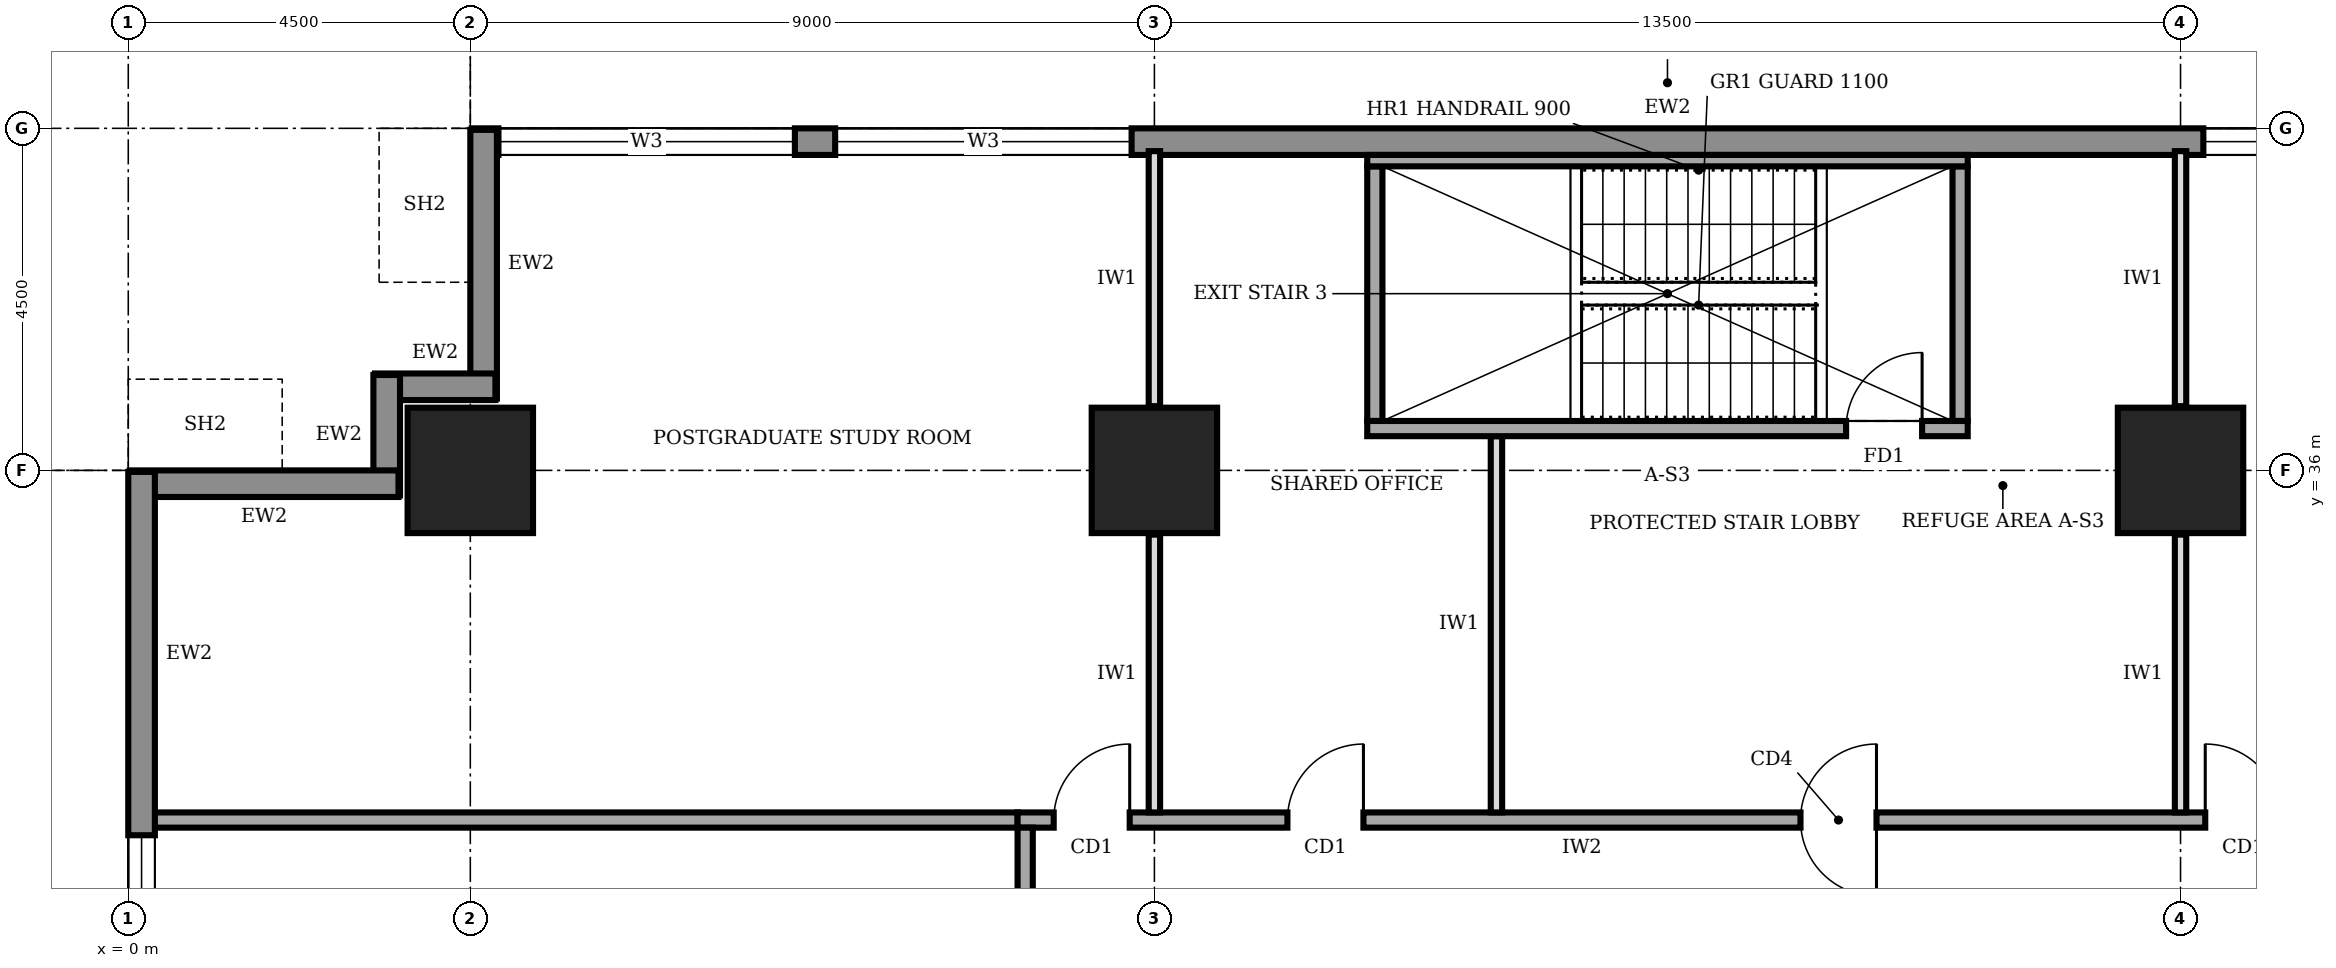
"""IFC4 building model, lengths in metres.
Left out: names, types, materials, properties, quantities, classifications, styles, units other than length and angle.
Written with IfcOpenShell. Run it as: python <this file> out.ifc"""

import sys

from ifc_helpers import new_model, si_unit, direction, frame, frame_2d, origin, origin_2d, place, context, subcontext, project, spatial, rectangle, extrude, element, fill, save


model = new_model("IFC4")
c1 = context("Model", 3, precision=1e-05, world=origin(), true_north=direction((0.0, 1.0)))
c2 = subcontext(c1, "Body", "Model", "MODEL_VIEW")
j1 = project(units=[si_unit("LENGTHUNIT", "METRE"), si_unit("PLANEANGLEUNIT", "RADIAN")], contexts=[c1])
p1 = place(None, origin())
s1 = spatial("IfcSite", under=j1, at=p1, CompositionType="ELEMENT")
p2 = place(p1, origin())
s2 = spatial("IfcBuilding", under=s1, at=p2, CompositionType="ELEMENT")
p3 = place(p2, frame((0.0, 0.0, 177.0)))
s3 = spatial("IfcBuildingStorey", under=s2, at=p3, CompositionType="ELEMENT", Elevation=177.0)
for number, where, z_axis, x_axis in (
    (1, (4.5, 36.0, 0.0), (0.0, 0.0, 1.0), (1.0, 0.0, 0.0)),
    (2, (13.5, 36.0, 0.0), (0.0, 0.0, 1.0), (1.0, 0.0, 0.0)),
    (3, (27.0, 36.0, 0.0), (0.0, 0.0, 1.0), (1.0, 0.0, 0.0)),
):
    element("IfcColumn", number, at=place(p3, frame(where, z_axis=z_axis, x_axis=x_axis)), inside=s3, PredefinedType="COLUMN", context=c2, shape_type="SweptSolid", body=[
        extrude(rectangle(XDim=1.65, YDim=1.65, at=origin_2d()), origin(), (0.0, 0.0, 1.0), 4.0),
    ])
p4 = place(p3, frame((35.98, 40.325, 0.0), z_axis=(0.0, 0.0, 1.0), x_axis=(-1.0, 0.0, 0.0)))
e4 = element("IfcWall", 4, at=p4, inside=s3, PredefinedType="STANDARD", context=c2, shape_type="SweptSolid", body=[
    extrude(rectangle(XDim=31.46, YDim=0.35, at=frame_2d((15.73, 0.0))), origin(), (0.0, 0.0, 1.0), 3.75),
])
p5 = place(p4, frame((27.21, 0.0, 0.95)))
e5 = element("IfcOpeningElement", 5, at=p5, cuts=e4, PredefinedType="OPENING", context=c2, shape_type="SweptSolid", body=[
    extrude(rectangle(XDim=3.9, YDim=1.8, at=frame_2d((1.95, 0.9))), frame((0.0, 0.185, 0.0), z_axis=(0.0, -1.0, 0.0), x_axis=(1.0, 0.0, 0.0)), (0.0, 0.0, 1.0), 0.37),
])
p6 = place(p4, frame((22.78, 0.0, 0.95)))
e6 = element("IfcOpeningElement", 6, at=p6, cuts=e4, PredefinedType="OPENING", context=c2, shape_type="SweptSolid", body=[
    extrude(rectangle(XDim=3.9, YDim=1.8, at=frame_2d((1.95, 0.9))), frame((0.0, 0.185, 0.0), z_axis=(0.0, -1.0, 0.0), x_axis=(1.0, 0.0, 0.0)), (0.0, 0.0, 1.0), 0.37),
])
p7 = place(p4, frame((4.78, 0.0, 0.95)))
e7 = element("IfcOpeningElement", 7, at=p7, cuts=e4, PredefinedType="OPENING", context=c2, shape_type="SweptSolid", body=[
    extrude(rectangle(XDim=3.9, YDim=1.8, at=frame_2d((1.95, 0.9))), frame((0.0, 0.185, 0.0), z_axis=(0.0, -1.0, 0.0), x_axis=(1.0, 0.0, 0.0)), (0.0, 0.0, 1.0), 0.37),
])
p8 = place(p3, frame((4.675, 40.48, 0.0), z_axis=(0.0, 0.0, 1.0), x_axis=(0.0, -1.0, 0.0)))
e8 = element("IfcWall", 8, at=p8, inside=s3, PredefinedType="STANDARD", context=c2, shape_type="SweptSolid", body=[
    extrude(rectangle(XDim=3.535, YDim=0.35, at=frame_2d((1.768, 0.0))), origin(), (0.0, 0.0, 1.0), 2.85),
])
for number, where, z_axis, x_axis in (
    (9, (4.83, 37.1, 0.0), (0.0, 0.0, 1.0), (-1.0, 0.0, 0.0)),
    (10, (3.4, 37.255, 0.0), (0.0, 0.0, 1.0), (0.0, -1.0, 0.0)),
):
    element("IfcWall", number, at=place(p3, frame(where, z_axis=z_axis, x_axis=x_axis)), inside=s3, PredefinedType="STANDARD", context=c2, shape_type="SweptSolid", body=[
        extrude(rectangle(XDim=1.585, YDim=0.35, at=frame_2d((0.792, 0.0))), origin(), (0.0, 0.0, 1.0), 3.75),
    ])
p9 = place(p3, frame((3.555, 35.825, 0.0), z_axis=(0.0, 0.0, 1.0), x_axis=(-1.0, 0.0, 0.0)))
e11 = element("IfcWall", 11, at=p9, inside=s3, PredefinedType="STANDARD", context=c2, shape_type="SweptSolid", body=[
    extrude(rectangle(XDim=3.535, YDim=0.35, at=frame_2d((1.768, 0.0))), origin(), (0.0, 0.0, 1.0), 2.85),
])
p10 = place(p3, frame((0.175, 35.98, 0.0), z_axis=(0.0, 0.0, 1.0), x_axis=(0.0, -1.0, 0.0)))
e12 = element("IfcWall", 12, at=p10, inside=s3, PredefinedType="STANDARD", context=c2, shape_type="SweptSolid", body=[
    extrude(rectangle(XDim=31.46, YDim=0.35, at=frame_2d((15.73, 0.0))), origin(), (0.0, 0.0, 1.0), 3.75),
])
p11 = place(p10, frame((27.21, 0.0, 0.95)))
e13 = element("IfcOpeningElement", 13, at=p11, cuts=e12, PredefinedType="OPENING", context=c2, shape_type="SweptSolid", body=[
    extrude(rectangle(XDim=3.9, YDim=1.8, at=frame_2d((1.95, 0.9))), frame((0.0, 0.185, 0.0), z_axis=(0.0, -1.0, 0.0), x_axis=(1.0, 0.0, 0.0)), (0.0, 0.0, 1.0), 0.37),
])
p12 = place(p10, frame((22.78, 0.0, 0.95)))
e14 = element("IfcOpeningElement", 14, at=p12, cuts=e12, PredefinedType="OPENING", context=c2, shape_type="SweptSolid", body=[
    extrude(rectangle(XDim=3.9, YDim=1.8, at=frame_2d((1.95, 0.9))), frame((0.0, 0.185, 0.0), z_axis=(0.0, -1.0, 0.0), x_axis=(1.0, 0.0, 0.0)), (0.0, 0.0, 1.0), 0.37),
])
p13 = place(p10, frame((18.28, 0.0, 0.95)))
e15 = element("IfcOpeningElement", 15, at=p13, cuts=e12, PredefinedType="OPENING", context=c2, shape_type="SweptSolid", body=[
    extrude(rectangle(XDim=3.9, YDim=1.8, at=frame_2d((1.95, 0.9))), frame((0.0, 0.185, 0.0), z_axis=(0.0, -1.0, 0.0), x_axis=(1.0, 0.0, 0.0)), (0.0, 0.0, 1.0), 0.37),
])
p14 = place(p10, frame((13.78, 0.0, 0.95)))
e16 = element("IfcOpeningElement", 16, at=p14, cuts=e12, PredefinedType="OPENING", context=c2, shape_type="SweptSolid", body=[
    extrude(rectangle(XDim=3.9, YDim=1.8, at=frame_2d((1.95, 0.9))), frame((0.0, 0.185, 0.0), z_axis=(0.0, -1.0, 0.0), x_axis=(1.0, 0.0, 0.0)), (0.0, 0.0, 1.0), 0.37),
])
p15 = place(p10, frame((9.28, 0.0, 0.95)))
e17 = element("IfcOpeningElement", 17, at=p15, cuts=e12, PredefinedType="OPENING", context=c2, shape_type="SweptSolid", body=[
    extrude(rectangle(XDim=3.9, YDim=1.8, at=frame_2d((1.95, 0.9))), frame((0.0, 0.185, 0.0), z_axis=(0.0, -1.0, 0.0), x_axis=(1.0, 0.0, 0.0)), (0.0, 0.0, 1.0), 0.37),
])
p16 = place(p10, frame((4.78, 0.0, 0.95)))
e18 = element("IfcOpeningElement", 18, at=p16, cuts=e12, PredefinedType="OPENING", context=c2, shape_type="SweptSolid", body=[
    extrude(rectangle(XDim=3.9, YDim=1.8, at=frame_2d((1.95, 0.9))), frame((0.0, 0.185, 0.0), z_axis=(0.0, -1.0, 0.0), x_axis=(1.0, 0.0, 0.0)), (0.0, 0.0, 1.0), 0.37),
])
p17 = place(p3, frame((28.6, 31.4, 0.0), z_axis=(0.0, 0.0, 1.0), x_axis=(-1.0, 0.0, 0.0)))
e19 = element("IfcWall", 19, at=p17, inside=s3, PredefinedType="SOLIDWALL", context=c2, shape_type="SweptSolid", body=[
    extrude(rectangle(XDim=16.9, YDim=0.2, at=frame_2d((8.45, 0.0))), origin(), (0.0, 0.0, 1.0), 3.75),
])
p18 = place(p17, frame((15.425, 0.0, 0.0)))
e20 = element("IfcOpeningElement", 20, at=p18, cuts=e19, PredefinedType="OPENING", context=c2, shape_type="SweptSolid", body=[
    extrude(rectangle(XDim=1.0, YDim=2.1, at=frame_2d((0.5, 1.05))), frame((0.0, 0.11, 0.0), z_axis=(0.0, -1.0, 0.0), x_axis=(1.0, 0.0, 0.0)), (0.0, 0.0, 1.0), 0.22),
])
p19 = place(p17, frame((12.35, 0.0, 0.0)))
e21 = element("IfcOpeningElement", 21, at=p19, cuts=e19, PredefinedType="OPENING", context=c2, shape_type="SweptSolid", body=[
    extrude(rectangle(XDim=1.0, YDim=2.1, at=frame_2d((0.5, 1.05))), frame((0.0, 0.11, 0.0), z_axis=(0.0, -1.0, 0.0), x_axis=(1.0, 0.0, 0.0)), (0.0, 0.0, 1.0), 0.22),
])
p20 = place(p17, frame((5.6, 0.0, 0.0)))
e22 = element("IfcOpeningElement", 22, at=p20, cuts=e19, PredefinedType="OPENING", context=c2, shape_type="SweptSolid", body=[
    extrude(rectangle(XDim=1.0, YDim=2.1, at=frame_2d((0.5, 1.05))), frame((0.0, 0.11, 0.0), z_axis=(0.0, -1.0, 0.0), x_axis=(1.0, 0.0, 0.0)), (0.0, 0.0, 1.0), 0.22),
])
p21 = place(p17, frame((0.275, 0.0, 0.0)))
e23 = element("IfcOpeningElement", 23, at=p21, cuts=e19, PredefinedType="OPENING", context=c2, shape_type="SweptSolid", body=[
    extrude(rectangle(XDim=1.0, YDim=2.1, at=frame_2d((0.5, 1.05))), frame((0.0, 0.11, 0.0), z_axis=(0.0, -1.0, 0.0), x_axis=(1.0, 0.0, 0.0)), (0.0, 0.0, 1.0), 0.22),
])
p22 = place(p3, frame((11.8, 31.3, 0.0), z_axis=(0.0, 0.0, 1.0), x_axis=(0.0, -1.0, 0.0)))
e24 = element("IfcWall", 24, at=p22, inside=s3, PredefinedType="SOLIDWALL", context=c2, shape_type="SweptSolid", body=[
    extrude(rectangle(XDim=22.3, YDim=0.2, at=frame_2d((11.15, 0.0))), origin(), (0.0, 0.0, 1.0), 3.75),
])
p23 = place(p22, frame((19.55, 0.0, 0.0)))
e25 = element("IfcOpeningElement", 25, at=p23, cuts=e24, PredefinedType="OPENING", context=c2, shape_type="SweptSolid", body=[
    extrude(rectangle(XDim=1.0, YDim=2.1, at=frame_2d((0.5, 1.05))), frame((0.0, 0.11, 0.0), z_axis=(0.0, -1.0, 0.0), x_axis=(1.0, 0.0, 0.0)), (0.0, 0.0, 1.0), 0.22),
])
p24 = place(p22, frame((16.15, 0.0, 0.0)))
e26 = element("IfcOpeningElement", 26, at=p24, cuts=e24, PredefinedType="OPENING", context=c2, shape_type="SweptSolid", body=[
    extrude(rectangle(XDim=0.9, YDim=2.1, at=frame_2d((0.45, 1.05))), frame((0.0, 0.11, 0.0), z_axis=(0.0, -1.0, 0.0), x_axis=(1.0, 0.0, 0.0)), (0.0, 0.0, 1.0), 0.22),
])
p25 = place(p22, frame((12.95, 0.0, 0.0)))
e27 = element("IfcOpeningElement", 27, at=p25, cuts=e24, PredefinedType="OPENING", context=c2, shape_type="SweptSolid", body=[
    extrude(rectangle(XDim=0.9, YDim=2.1, at=frame_2d((0.45, 1.05))), frame((0.0, 0.11, 0.0), z_axis=(0.0, -1.0, 0.0), x_axis=(1.0, 0.0, 0.0)), (0.0, 0.0, 1.0), 0.22),
])
p26 = place(p22, frame((7.4, 0.0, 0.0)))
e28 = element("IfcOpeningElement", 28, at=p26, cuts=e24, PredefinedType="OPENING", context=c2, shape_type="SweptSolid", body=[
    extrude(rectangle(XDim=0.9, YDim=2.1, at=frame_2d((0.45, 1.05))), frame((0.0, 0.11, 0.0), z_axis=(0.0, -1.0, 0.0), x_axis=(1.0, 0.0, 0.0)), (0.0, 0.0, 1.0), 0.22),
])
p27 = place(p22, frame((4.8, 0.0, 0.0)))
e29 = element("IfcOpeningElement", 29, at=p27, cuts=e24, PredefinedType="OPENING", context=c2, shape_type="SweptSolid", body=[
    extrude(rectangle(XDim=1.0, YDim=2.1, at=frame_2d((0.5, 1.05))), frame((0.0, 0.11, 0.0), z_axis=(0.0, -1.0, 0.0), x_axis=(1.0, 0.0, 0.0)), (0.0, 0.0, 1.0), 0.22),
])
p28 = place(p22, frame((9.9, 0.0, 0.0)))
e30 = element("IfcOpeningElement", 30, at=p28, cuts=e24, PredefinedType="OPENING", context=c2, shape_type="SweptSolid", body=[
    extrude(rectangle(XDim=1.0, YDim=2.1, at=frame_2d((0.5, 1.05))), frame((0.0, 0.11, 0.0), z_axis=(0.0, -1.0, 0.0), x_axis=(1.0, 0.0, 0.0)), (0.0, 0.0, 1.0), 0.22),
])
p29 = place(p22, frame((1.55, 0.0, 0.0)))
e31 = element("IfcOpeningElement", 31, at=p29, cuts=e24, PredefinedType="OPENING", context=c2, shape_type="SweptSolid", body=[
    extrude(rectangle(XDim=1.0, YDim=2.1, at=frame_2d((0.5, 1.05))), frame((0.0, 0.11, 0.0), z_axis=(0.0, -1.0, 0.0), x_axis=(1.0, 0.0, 0.0)), (0.0, 0.0, 1.0), 0.22),
])
p30 = place(p3, frame((0.3, 31.4, 0.0), z_axis=(0.0, 0.0, 1.0), x_axis=(1.0, 0.0, 0.0)))
e32 = element("IfcWall", 32, at=p30, inside=s3, PredefinedType="SOLIDWALL", context=c2, shape_type="SweptSolid", body=[
    extrude(rectangle(XDim=11.4, YDim=0.2, at=frame_2d((5.7, 0.0))), origin(), (0.0, 0.0, 1.0), 3.75),
])
p31 = place(p3, frame((13.5, 31.5, 0.0), z_axis=(0.0, 0.0, 1.0), x_axis=(0.0, 1.0, 0.0)))
e33 = element("IfcWall", 33, at=p31, inside=s3, PredefinedType="PARTITIONING", context=c2, shape_type="SweptSolid", body=[
    extrude(rectangle(XDim=3.655, YDim=0.15, at=frame_2d((1.828, 0.0))), origin(), (0.0, 0.0, 1.0), 2.85),
])
p32 = place(p3, frame((13.5, 36.845, 0.0), z_axis=(0.0, 0.0, 1.0), x_axis=(0.0, 1.0, 0.0)))
e34 = element("IfcWall", 34, at=p32, inside=s3, PredefinedType="PARTITIONING", context=c2, shape_type="SweptSolid", body=[
    extrude(rectangle(XDim=3.355, YDim=0.15, at=frame_2d((1.677, 0.0))), origin(), (0.0, 0.0, 1.0), 2.85),
])
p33 = place(p3, frame((18.0, 31.5, 0.0), z_axis=(0.0, 0.0, 1.0), x_axis=(0.0, 1.0, 0.0)))
e35 = element("IfcWall", 35, at=p33, inside=s3, PredefinedType="PARTITIONING", context=c2, shape_type="SweptSolid", body=[
    extrude(rectangle(XDim=4.95, YDim=0.15, at=frame_2d((2.475, 0.0))), origin(), (0.0, 0.0, 1.0), 3.75),
])
p34 = place(p3, frame((27.0, 31.5, 0.0), z_axis=(0.0, 0.0, 1.0), x_axis=(0.0, 1.0, 0.0)))
e36 = element("IfcWall", 36, at=p34, inside=s3, PredefinedType="PARTITIONING", context=c2, shape_type="SweptSolid", body=[
    extrude(rectangle(XDim=3.655, YDim=0.15, at=frame_2d((1.828, 0.0))), origin(), (0.0, 0.0, 1.0), 2.85),
])
p35 = place(p3, frame((27.0, 36.845, 0.0), z_axis=(0.0, 0.0, 1.0), x_axis=(0.0, 1.0, 0.0)))
e37 = element("IfcWall", 37, at=p35, inside=s3, PredefinedType="PARTITIONING", context=c2, shape_type="SweptSolid", body=[
    extrude(rectangle(XDim=3.355, YDim=0.15, at=frame_2d((1.677, 0.0))), origin(), (0.0, 0.0, 1.0), 2.85),
])
p36 = place(p3, frame((16.3, 36.55, 0.0), z_axis=(0.0, 0.0, 1.0), x_axis=(1.0, 0.0, 0.0)))
e38 = element("IfcWall", 38, at=p36, inside=s3, PredefinedType="SOLIDWALL", context=c2, shape_type="SweptSolid", body=[
    extrude(rectangle(XDim=7.9, YDim=0.2, at=frame_2d((3.95, 0.0))), origin(), (0.0, 0.0, 1.0), 3.75),
])
p37 = place(p36, frame((6.3, 0.0, 0.0)))
e39 = element("IfcOpeningElement", 39, at=p37, cuts=e38, PredefinedType="OPENING", context=c2, shape_type="SweptSolid", body=[
    extrude(rectangle(XDim=1.0, YDim=2.1, at=frame_2d((0.5, 1.05))), frame((0.0, 0.11, 0.0), z_axis=(0.0, -1.0, 0.0), x_axis=(1.0, 0.0, 0.0)), (0.0, 0.0, 1.0), 0.22),
])
p38 = place(p3, frame((16.3, 40.075, 0.0), z_axis=(0.0, 0.0, 1.0), x_axis=(1.0, 0.0, 0.0)))
e40 = element("IfcWall", 40, at=p38, inside=s3, PredefinedType="SOLIDWALL", context=c2, shape_type="SweptSolid", body=[
    extrude(rectangle(XDim=7.9, YDim=0.15, at=frame_2d((3.95, 0.0))), origin(), (0.0, 0.0, 1.0), 3.75),
])
for number, where, z_axis, x_axis in (
    (41, (16.4, 36.65, 0.0), (0.0, 0.0, 1.0), (0.0, 1.0, 0.0)),
    (42, (24.1, 36.65, 0.0), (0.0, 0.0, 1.0), (0.0, 1.0, 0.0)),
):
    element("IfcWall", number, at=place(p3, frame(where, z_axis=z_axis, x_axis=x_axis)), inside=s3, PredefinedType="SOLIDWALL", context=c2, shape_type="SweptSolid", body=[
        extrude(rectangle(XDim=3.35, YDim=0.2, at=frame_2d((1.675, 0.0))), origin(), (0.0, 0.0, 1.0), 3.75),
    ])
p39 = place(p5, origin())
e43 = element("IfcWindow", 43, at=p39, inside=s3, PartitioningType="SINGLE_PANEL", PredefinedType="WINDOW", context=c2, shape_type="SweptSolid", body=[
    extrude(rectangle(XDim=3.9, YDim=1.8, at=frame_2d((1.95, 0.9))), frame((0.0, 0.03, 0.0), z_axis=(0.0, -1.0, 0.0), x_axis=(1.0, 0.0, 0.0)), (0.0, 0.0, 1.0), 0.06),
])
fill(e5, e43)
p40 = place(p6, origin())
e44 = element("IfcWindow", 44, at=p40, inside=s3, PartitioningType="SINGLE_PANEL", PredefinedType="WINDOW", context=c2, shape_type="SweptSolid", body=[
    extrude(rectangle(XDim=3.9, YDim=1.8, at=frame_2d((1.95, 0.9))), frame((0.0, 0.03, 0.0), z_axis=(0.0, -1.0, 0.0), x_axis=(1.0, 0.0, 0.0)), (0.0, 0.0, 1.0), 0.06),
])
fill(e6, e44)
p41 = place(p7, origin())
e45 = element("IfcWindow", 45, at=p41, inside=s3, PartitioningType="SINGLE_PANEL", PredefinedType="WINDOW", context=c2, shape_type="SweptSolid", body=[
    extrude(rectangle(XDim=3.9, YDim=1.8, at=frame_2d((1.95, 0.9))), frame((0.0, 0.03, 0.0), z_axis=(0.0, -1.0, 0.0), x_axis=(1.0, 0.0, 0.0)), (0.0, 0.0, 1.0), 0.06),
])
fill(e7, e45)
p42 = place(p16, origin())
e46 = element("IfcWindow", 46, at=p42, inside=s3, PartitioningType="SINGLE_PANEL", PredefinedType="WINDOW", context=c2, shape_type="SweptSolid", body=[
    extrude(rectangle(XDim=3.9, YDim=1.8, at=frame_2d((1.95, 0.9))), frame((0.0, 0.03, 0.0), z_axis=(0.0, -1.0, 0.0), x_axis=(1.0, 0.0, 0.0)), (0.0, 0.0, 1.0), 0.06),
])
fill(e18, e46)
p43 = place(p18, frame((1.0, 0.0, 0.0), z_axis=(0.0, 0.0, 1.0), x_axis=(-1.0, 0.0, 0.0)))
e47 = element("IfcDoor", 47, at=p43, inside=s3, OperationType="SINGLE_SWING_RIGHT", PredefinedType="DOOR", context=c2, shape_type="SweptSolid", body=[
    extrude(rectangle(XDim=1.0, YDim=2.1, at=frame_2d((0.5, 1.05))), frame((0.0, 0.025, 0.0), z_axis=(0.0, -1.0, 0.0), x_axis=(1.0, 0.0, 0.0)), (0.0, 0.0, 1.0), 0.05),
])
fill(e20, e47)
p44 = place(p19, frame((1.0, 0.0, 0.0), z_axis=(0.0, 0.0, 1.0), x_axis=(-1.0, 0.0, 0.0)))
e48 = element("IfcDoor", 48, at=p44, inside=s3, OperationType="SINGLE_SWING_RIGHT", PredefinedType="DOOR", context=c2, shape_type="SweptSolid", body=[
    extrude(rectangle(XDim=1.0, YDim=2.1, at=frame_2d((0.5, 1.05))), frame((0.0, 0.025, 0.0), z_axis=(0.0, -1.0, 0.0), x_axis=(1.0, 0.0, 0.0)), (0.0, 0.0, 1.0), 0.05),
])
fill(e21, e48)
p45 = place(p20, origin())
e49 = element("IfcDoor", 49, at=p45, inside=s3, OperationType="DOUBLE_SWING_LEFT", PredefinedType="DOOR", context=c2, shape_type="SweptSolid", body=[
    extrude(rectangle(XDim=1.0, YDim=2.1, at=frame_2d((0.5, 1.05))), frame((0.0, 0.025, 0.0), z_axis=(0.0, -1.0, 0.0), x_axis=(1.0, 0.0, 0.0)), (0.0, 0.0, 1.0), 0.05),
])
fill(e22, e49)
p46 = place(p21, frame((1.0, 0.0, 0.0), z_axis=(0.0, 0.0, 1.0), x_axis=(-1.0, 0.0, 0.0)))
e50 = element("IfcDoor", 50, at=p46, inside=s3, OperationType="SINGLE_SWING_LEFT", PredefinedType="DOOR", context=c2, shape_type="SweptSolid", body=[
    extrude(rectangle(XDim=1.0, YDim=2.1, at=frame_2d((0.5, 1.05))), frame((0.0, 0.025, 0.0), z_axis=(0.0, -1.0, 0.0), x_axis=(1.0, 0.0, 0.0)), (0.0, 0.0, 1.0), 0.05),
])
fill(e23, e50)
p47 = place(p37, origin())
e51 = element("IfcDoor", 51, at=p47, inside=s3, OperationType="SINGLE_SWING_RIGHT", PredefinedType="DOOR", context=c2, shape_type="SweptSolid", body=[
    extrude(rectangle(XDim=1.0, YDim=2.1, at=frame_2d((0.5, 1.05))), frame((0.0, 0.025, 0.0), z_axis=(0.0, -1.0, 0.0), x_axis=(1.0, 0.0, 0.0)), (0.0, 0.0, 1.0), 0.05),
])
fill(e39, e51)
save(model, sys.argv[1])
